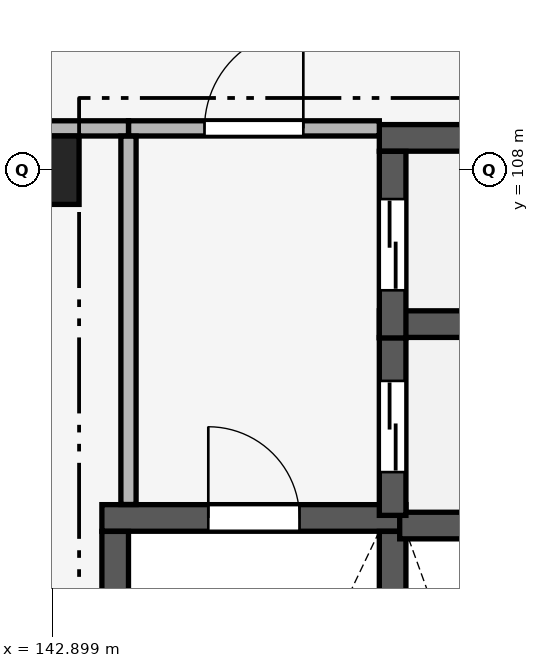
"""IFC4 building model, lengths in metres.
Left out: names, types, materials, properties, quantities, classifications, styles, units other than length and angle.
Written with IfcOpenShell. Run it as: python <this file> out.ifc"""

import sys

from ifc_helpers import new_model, si_unit, direction, frame, frame_2d, origin, origin_2d, place, context, subcontext, project, spatial, rectangle, extrude, element, fill, save


model = new_model("IFC4")
c1 = context("Model", 3, precision=1e-05, world=origin(), true_north=direction((0.0, 1.0)))
c2 = subcontext(c1, "Body", "Model", "MODEL_VIEW")
j1 = project(units=[si_unit("LENGTHUNIT", "METRE"), si_unit("PLANEANGLEUNIT", "RADIAN")], contexts=[c1])
p1 = place(None, origin())
s1 = spatial("IfcSite", under=j1, at=p1, CompositionType="ELEMENT")
p2 = place(p1, origin())
s2 = spatial("IfcBuilding", under=s1, at=p2, CompositionType="ELEMENT")
p3 = place(p2, origin())
s3 = spatial("IfcBuildingStorey", under=s2, at=p3, CompositionType="ELEMENT", Elevation=0.0)
p4 = place(p3, frame((142.8, 108.0, 0.0), z_axis=(0.0, 0.0, 1.0), x_axis=(1.0, 0.0, 0.0)))
e1 = element("IfcColumn", 1, at=p4, inside=s3, PredefinedType="COLUMN", context=c2, shape_type="SweptSolid", body=[
    extrude(rectangle(XDim=0.9, YDim=0.9, at=origin_2d()), origin(), (0.0, 0.0, 1.0), 5.1),
])
p5 = place(p3, frame((143.55, 103.425, 0.0), z_axis=(0.0, 0.0, 1.0), x_axis=(1.0, 0.0, 0.0)))
e2 = element("IfcWall", 2, at=p5, inside=s3, PredefinedType="SHEAR", context=c2, shape_type="SweptSolid", body=[
    extrude(rectangle(XDim=4.0, YDim=0.35, at=frame_2d((2.0, 0.0))), origin(), (0.0, 0.0, 1.0), 4.82),
])
p6 = place(p5, frame((1.4, 0.0, 0.0)))
e3 = element("IfcOpeningElement", 3, at=p6, cuts=e2, PredefinedType="OPENING", context=c2, shape_type="SweptSolid", body=[
    extrude(rectangle(XDim=1.2, YDim=2.2, at=frame_2d((0.6, 1.1))), frame((0.0, 0.19, 0.0), z_axis=(0.0, -1.0, 0.0), x_axis=(1.0, 0.0, 0.0)), (0.0, 0.0, 1.0), 0.38),
])
for number, where, z_axis, x_axis in (
    (4, (143.725, 96.352, 0.0), (0.0, 0.0, 1.0), (0.0, 1.0, 0.0)),
    (5, (147.375, 96.352, 0.0), (0.0, 0.0, 1.0), (0.0, 1.0, 0.0)),
):
    element("IfcWall", number, at=place(p3, frame(where, z_axis=z_axis, x_axis=x_axis)), inside=s3, PredefinedType="SHEAR", context=c2, shape_type="SweptSolid", body=[
        extrude(rectangle(XDim=6.896, YDim=0.35, at=frame_2d((3.448, 0.0))), origin(), (0.0, 0.0, 1.0), 4.82),
    ])
p7 = place(p3, frame((147.468, 103.325, 0.0), z_axis=(0.0, 0.0, 1.0), x_axis=(1.0, 0.0, 0.0)))
e6 = element("IfcWall", 6, at=p7, inside=s3, PredefinedType="SHEAR", context=c2, shape_type="SweptSolid", body=[
    extrude(rectangle(XDim=2.932, YDim=0.35, at=frame_2d((1.466, 0.0))), origin(), (0.0, 0.0, 1.0), 4.82),
])
p8 = place(p3, frame((147.2, 105.975, 0.0), z_axis=(0.0, 0.0, 1.0), x_axis=(1.0, 0.0, 0.0)))
e7 = element("IfcWall", 7, at=p8, inside=s3, PredefinedType="SHEAR", context=c2, shape_type="SweptSolid", body=[
    extrude(rectangle(XDim=3.2, YDim=0.35, at=frame_2d((1.6, 0.0))), origin(), (0.0, 0.0, 1.0), 4.82),
])
p9 = place(p3, frame((147.375, 103.459, 0.0), z_axis=(0.0, 0.0, 1.0), x_axis=(0.0, 1.0, 0.0)))
e8 = element("IfcWall", 8, at=p9, inside=s3, PredefinedType="SHEAR", context=c2, shape_type="SweptSolid", body=[
    extrude(rectangle(XDim=2.339, YDim=0.35, at=frame_2d((1.169, 0.0))), origin(), (0.0, 0.0, 1.0), 4.82),
])
p10 = place(p9, frame((0.569, 0.0, 0.0)))
e9 = element("IfcOpeningElement", 9, at=p10, cuts=e8, PredefinedType="OPENING", context=c2, shape_type="SweptSolid", body=[
    extrude(rectangle(XDim=1.2, YDim=2.15, at=frame_2d((0.6, 1.075))), frame((0.0, 0.19, 0.0), z_axis=(0.0, -1.0, 0.0), x_axis=(1.0, 0.0, 0.0)), (0.0, 0.0, 1.0), 0.38),
])
p11 = place(p3, frame((147.2, 108.425, 0.0), z_axis=(0.0, 0.0, 1.0), x_axis=(1.0, 0.0, 0.0)))
e10 = element("IfcWall", 10, at=p11, inside=s3, PredefinedType="SHEAR", context=c2, shape_type="SweptSolid", body=[
    extrude(rectangle(XDim=3.555, YDim=0.35, at=frame_2d((1.777, 0.0))), origin(), (0.0, 0.0, 1.0), 4.82),
])
p12 = place(p3, frame((147.375, 105.793, 0.0), z_axis=(0.0, 0.0, 1.0), x_axis=(0.0, 1.0, 0.0)))
e11 = element("IfcWall", 11, at=p12, inside=s3, PredefinedType="SHEAR", context=c2, shape_type="SweptSolid", body=[
    extrude(rectangle(XDim=2.455, YDim=0.35, at=frame_2d((1.228, 0.0))), origin(), (0.0, 0.0, 1.0), 4.82),
])
p13 = place(p12, frame((0.627, 0.0, 0.0)))
e12 = element("IfcOpeningElement", 12, at=p13, cuts=e11, PredefinedType="OPENING", context=c2, shape_type="SweptSolid", body=[
    extrude(rectangle(XDim=1.2, YDim=2.15, at=frame_2d((0.6, 1.075))), frame((0.0, 0.19, 0.0), z_axis=(0.0, -1.0, 0.0), x_axis=(1.0, 0.0, 0.0)), (0.0, 0.0, 1.0), 0.38),
])
p14 = place(p3, frame((143.9, 108.55, 0.0), z_axis=(0.0, 0.0, 1.0), x_axis=(1.0, 0.0, 0.0)))
e13 = element("IfcWall", 13, at=p14, inside=s3, PredefinedType="PARTITIONING", context=c2, shape_type="SweptSolid", body=[
    extrude(rectangle(XDim=3.3, YDim=0.2, at=frame_2d((1.65, 0.0))), origin(), (0.0, 0.0, 1.0), 4.82),
])
p15 = place(p14, frame((1.0, 0.0, 0.0)))
e14 = element("IfcOpeningElement", 14, at=p15, cuts=e13, PredefinedType="OPENING", context=c2, shape_type="SweptSolid", body=[
    extrude(rectangle(XDim=1.3, YDim=2.2, at=frame_2d((0.65, 1.1))), frame((0.0, 0.115, 0.0), z_axis=(0.0, -1.0, 0.0), x_axis=(1.0, 0.0, 0.0)), (0.0, 0.0, 1.0), 0.23),
])
p16 = place(p3, frame((142.355, 108.55, 0.0), z_axis=(0.0, 0.0, 1.0), x_axis=(1.0, 0.0, 0.0)))
e15 = element("IfcWall", 15, at=p16, inside=s3, PredefinedType="PARTITIONING", context=c2, shape_type="SweptSolid", body=[
    extrude(rectangle(XDim=1.545, YDim=0.2, at=frame_2d((0.772, 0.0))), origin(), (0.0, 0.0, 1.0), 4.17),
])
p17 = place(p3, frame((143.9, 103.602, 0.0), z_axis=(0.0, 0.0, 1.0), x_axis=(0.0, 1.0, 0.0)))
e16 = element("IfcWall", 16, at=p17, inside=s3, PredefinedType="PARTITIONING", context=c2, shape_type="SweptSolid", body=[
    extrude(rectangle(XDim=4.846, YDim=0.2, at=frame_2d((2.423, 0.0))), origin(), (0.0, 0.0, 1.0), 4.82),
])
p18 = place(p6, origin())
e17 = element("IfcDoor", 17, at=p18, inside=s3, OperationType="SINGLE_SWING_LEFT", PredefinedType="DOOR", context=c2, shape_type="SweptSolid", body=[
    extrude(rectangle(XDim=1.2, YDim=2.2, at=frame_2d((0.6, 1.1))), frame((0.0, 0.025, 0.0), z_axis=(0.0, -1.0, 0.0), x_axis=(1.0, 0.0, 0.0)), (0.0, 0.0, 1.0), 0.05),
])
fill(e3, e17)
p19 = place(p10, origin())
e18 = element("IfcDoor", 18, at=p19, inside=s3, OperationType="DOUBLE_DOOR_SLIDING", PredefinedType="DOOR", context=c2, shape_type="SweptSolid", body=[
    extrude(rectangle(XDim=1.2, YDim=2.15, at=frame_2d((0.6, 1.075))), frame((0.0, 0.025, 0.0), z_axis=(0.0, -1.0, 0.0), x_axis=(1.0, 0.0, 0.0)), (0.0, 0.0, 1.0), 0.05),
])
fill(e9, e18)
p20 = place(p13, origin())
e19 = element("IfcDoor", 19, at=p20, inside=s3, OperationType="DOUBLE_DOOR_SLIDING", PredefinedType="DOOR", context=c2, shape_type="SweptSolid", body=[
    extrude(rectangle(XDim=1.2, YDim=2.15, at=frame_2d((0.6, 1.075))), frame((0.0, 0.025, 0.0), z_axis=(0.0, -1.0, 0.0), x_axis=(1.0, 0.0, 0.0)), (0.0, 0.0, 1.0), 0.05),
])
fill(e12, e19)
p21 = place(p15, origin())
e20 = element("IfcDoor", 20, at=p21, inside=s3, OperationType="SINGLE_SWING_RIGHT", PredefinedType="DOOR", context=c2, shape_type="SweptSolid", body=[
    extrude(rectangle(XDim=1.3, YDim=2.2, at=frame_2d((0.65, 1.1))), frame((0.0, 0.025, 0.0), z_axis=(0.0, -1.0, 0.0), x_axis=(1.0, 0.0, 0.0)), (0.0, 0.0, 1.0), 0.05),
])
fill(e14, e20)
save(model, sys.argv[1])
